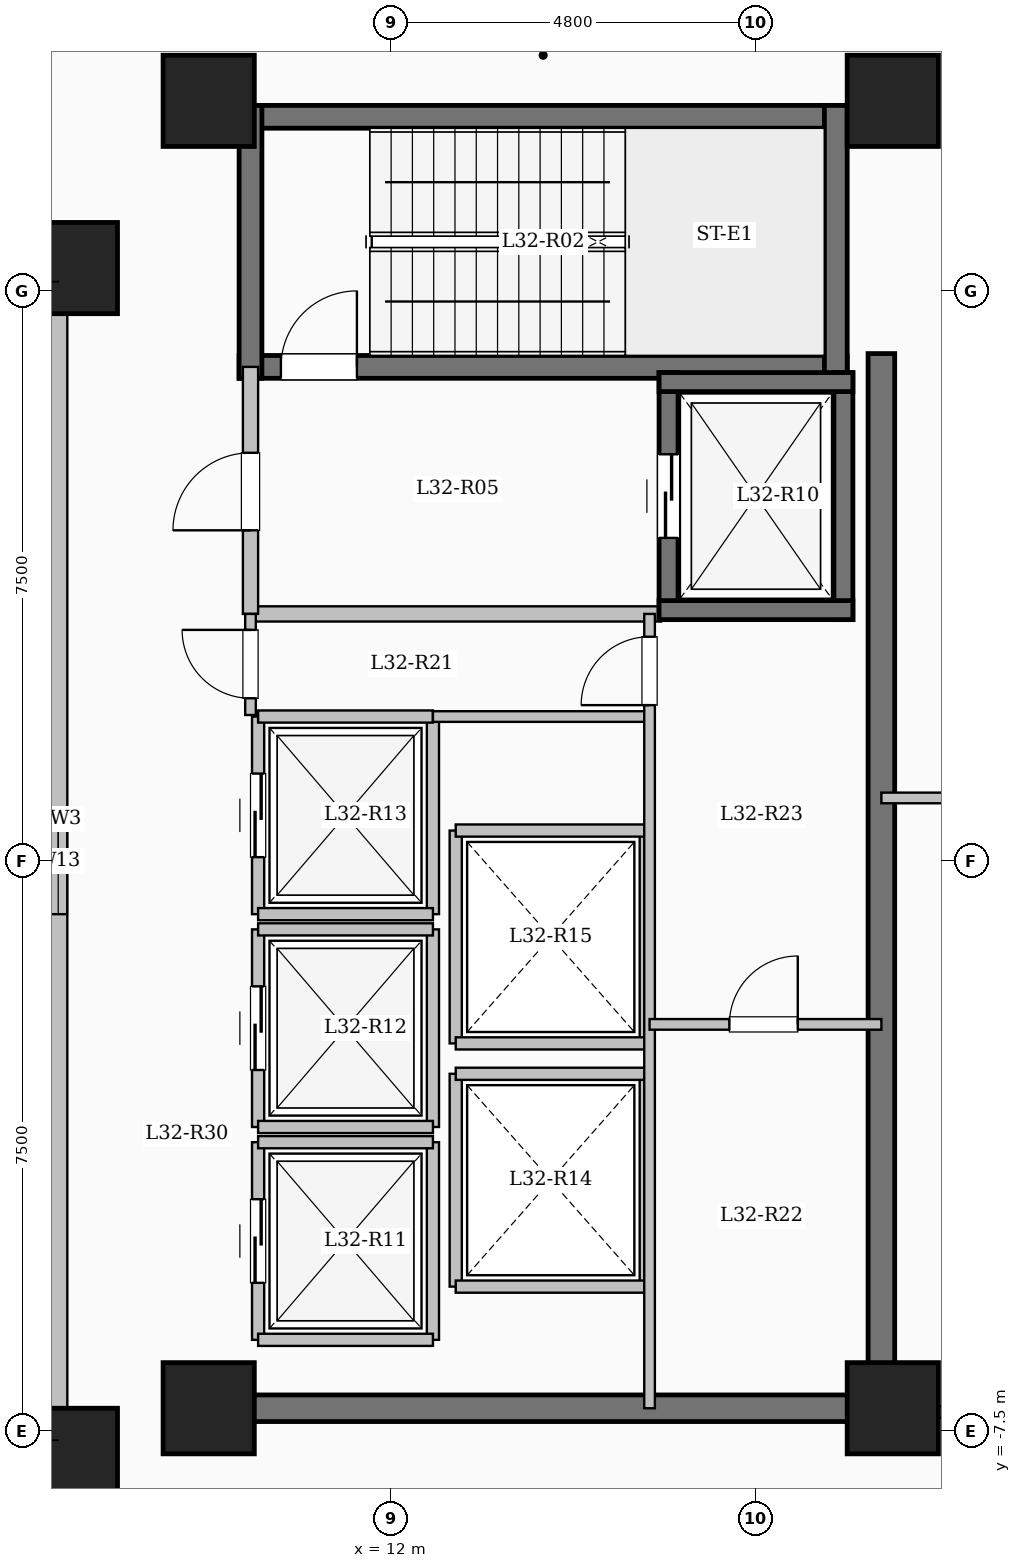
"""IFC4 building model, lengths in metres.
Left out: names, types, materials, properties, quantities, classifications, styles, units other than length and angle.
Written with IfcOpenShell. Run it as: python <this file> out.ifc"""

import sys

from ifc_helpers import new_model, si_unit, direction, frame, frame_2d, origin, origin_2d, place, context, subcontext, project, spatial, rectangle, extrude, element, fill, save


model = new_model("IFC4")
c1 = context("Model", 3, precision=1e-05, world=origin(), true_north=direction((0.0, 1.0)))
c2 = subcontext(c1, "Body", "Model", "MODEL_VIEW")
j1 = project(units=[si_unit("LENGTHUNIT", "METRE"), si_unit("PLANEANGLEUNIT", "RADIAN")], contexts=[c1])
p1 = place(None, origin())
s1 = spatial("IfcSite", under=j1, at=p1, CompositionType="ELEMENT")
p2 = place(p1, origin())
s2 = spatial("IfcBuilding", under=s1, at=p2, CompositionType="ELEMENT")
p3 = place(p2, frame((0.0, 0.0, 118.5)))
s3 = spatial("IfcBuildingStorey", under=s2, at=p3, CompositionType="ELEMENT", Elevation=118.5)
for number, where, z_axis, x_axis in (
    (1, (7.8, -7.8, 0.0), (0.0, 0.0, 1.0), (1.0, 0.0, 0.0)),
    (2, (7.8, 7.8, 0.0), (0.0, 0.0, 1.0), (1.0, 0.0, 0.0)),
    (3, (9.6, -7.2, 0.0), (0.0, 0.0, 1.0), (1.0, 0.0, 0.0)),
    (4, (9.6, 10.0, 0.0), (0.0, 0.0, 1.0), (1.0, 0.0, 0.0)),
    (5, (18.6, -7.2, 0.0), (0.0, 0.0, 1.0), (1.0, 0.0, 0.0)),
    (6, (18.6, 10.0, 0.0), (0.0, 0.0, 1.0), (1.0, 0.0, 0.0)),
):
    element("IfcColumn", number, at=place(p3, frame(where, z_axis=z_axis, x_axis=x_axis)), inside=s3, PredefinedType="COLUMN", context=c2, shape_type="SweptSolid", body=[
        extrude(rectangle(XDim=1.2, YDim=1.2, at=origin_2d()), origin(), (0.0, 0.0, 1.0), 4.5),
    ])
p4 = place(p3, frame((7.62, -7.62, 0.0), z_axis=(0.0, 0.0, 1.0), x_axis=(0.0, 1.0, 0.0)))
e7 = element("IfcWall", 7, at=p4, inside=s3, PredefinedType="SOLIDWALL", context=c2, shape_type="SweptSolid", body=[
    extrude(rectangle(XDim=15.24, YDim=0.24, at=frame_2d((7.62, 0.0))), origin(), (0.0, 0.0, 1.0), 4.2),
])
p5 = place(p4, frame((6.92, 0.0, 0.95)))
e8 = element("IfcOpeningElement", 8, at=p5, cuts=e7, PredefinedType="OPENING", context=c2, shape_type="SweptSolid", body=[
    extrude(rectangle(XDim=1.4, YDim=1.5, at=frame_2d((0.7, 0.75))), frame((0.0, 0.13, 0.0), z_axis=(0.0, -1.0, 0.0), x_axis=(1.0, 0.0, 0.0)), (0.0, 0.0, 1.0), 0.26),
])
p6 = place(p3, frame((10.0, 9.79, 0.0), z_axis=(0.0, 0.0, 1.0), x_axis=(1.0, 0.0, 0.0)))
e9 = element("IfcWall", 9, at=p6, inside=s3, PredefinedType="SHEAR", context=c2, shape_type="SweptSolid", body=[
    extrude(rectangle(XDim=8.0, YDim=0.3, at=frame_2d((4.0, 0.0))), origin(), (0.0, 0.0, 1.0), 4.5),
])
p7 = place(p3, frame((10.0, 6.5, 0.0), z_axis=(0.0, 0.0, 1.0), x_axis=(1.0, 0.0, 0.0)))
e10 = element("IfcWall", 10, at=p7, inside=s3, PredefinedType="SHEAR", context=c2, shape_type="SweptSolid", body=[
    extrude(rectangle(XDim=8.0, YDim=0.3, at=frame_2d((4.0, 0.0))), origin(), (0.0, 0.0, 1.0), 4.5),
])
p8 = place(p7, frame((0.55, 0.0, 0.0)))
e11 = element("IfcOpeningElement", 11, at=p8, cuts=e10, PredefinedType="OPENING", context=c2, shape_type="SweptSolid", body=[
    extrude(rectangle(XDim=1.0, YDim=2.15, at=frame_2d((0.5, 1.075))), frame((0.0, 0.16, 0.0), z_axis=(0.0, -1.0, 0.0), x_axis=(1.0, 0.0, 0.0)), (0.0, 0.0, 1.0), 0.32),
])
for number, where, z_axis, x_axis in (
    (12, (10.15, 6.35, 0.0), (0.0, 0.0, 1.0), (0.0, 1.0, 0.0)),
    (13, (17.85, 6.35, 0.0), (0.0, 0.0, 1.0), (0.0, 1.0, 0.0)),
):
    element("IfcWall", number, at=place(p3, frame(where, z_axis=z_axis, x_axis=x_axis)), inside=s3, PredefinedType="SHEAR", context=c2, shape_type="SweptSolid", body=[
        extrude(rectangle(XDim=3.59, YDim=0.3, at=frame_2d((1.795, 0.0))), origin(), (0.0, 0.0, 1.0), 4.5),
    ])
p9 = place(p3, frame((10.15, 3.25, 0.0), z_axis=(0.0, 0.0, 1.0), x_axis=(1.0, 0.0, 0.0)))
e14 = element("IfcWall", 14, at=p9, inside=s3, PredefinedType="SOLIDWALL", context=c2, shape_type="SweptSolid", body=[
    extrude(rectangle(XDim=5.4, YDim=0.2, at=frame_2d((2.7, 0.0))), origin(), (0.0, 0.0, 1.0), 4.2),
])
p10 = place(p3, frame((10.15, 3.25, 0.0), z_axis=(0.0, 0.0, 1.0), x_axis=(0.0, 1.0, 0.0)))
e15 = element("IfcWall", 15, at=p10, inside=s3, PredefinedType="SOLIDWALL", context=c2, shape_type="SweptSolid", body=[
    extrude(rectangle(XDim=3.25, YDim=0.2, at=frame_2d((1.625, 0.0))), origin(), (0.0, 0.0, 1.0), 4.2),
])
p11 = place(p10, frame((1.1, 0.0, 0.0)))
e16 = element("IfcOpeningElement", 16, at=p11, cuts=e15, PredefinedType="OPENING", context=c2, shape_type="SweptSolid", body=[
    extrude(rectangle(XDim=1.02, YDim=2.15, at=frame_2d((0.51, 1.075))), frame((0.0, 0.11, 0.0), z_axis=(0.0, -1.0, 0.0), x_axis=(1.0, 0.0, 0.0)), (0.0, 0.0, 1.0), 0.22),
])
p12 = place(p3, frame((15.65, 3.175, 0.0), z_axis=(0.0, 0.0, 1.0), x_axis=(0.0, 1.0, 0.0)))
e17 = element("IfcWall", 17, at=p12, inside=s3, PredefinedType="SHEAR", context=c2, shape_type="SweptSolid", body=[
    extrude(rectangle(XDim=3.25, YDim=0.25, at=frame_2d((1.625, 0.0))), origin(), (0.0, 0.0, 1.0), 4.5),
])
p13 = place(p12, frame((1.075, 0.0, 0.0)))
e18 = element("IfcOpeningElement", 18, at=p13, cuts=e17, PredefinedType="OPENING", context=c2, shape_type="SweptSolid", body=[
    extrude(rectangle(XDim=1.1, YDim=2.15, at=frame_2d((0.55, 1.075))), frame((0.0, 0.135, 0.0), z_axis=(0.0, -1.0, 0.0), x_axis=(1.0, 0.0, 0.0)), (0.0, 0.0, 1.0), 0.27),
])
p14 = place(p3, frame((17.95, 3.175, 0.0), z_axis=(0.0, 0.0, 1.0), x_axis=(0.0, 1.0, 0.0)))
e19 = element("IfcWall", 19, at=p14, inside=s3, PredefinedType="SHEAR", context=c2, shape_type="SweptSolid", body=[
    extrude(rectangle(XDim=3.25, YDim=0.25, at=frame_2d((1.625, 0.0))), origin(), (0.0, 0.0, 1.0), 4.5),
])
for number, where, z_axis, x_axis in (
    (20, (15.525, 3.3, 0.0), (0.0, 0.0, 1.0), (1.0, 0.0, 0.0)),
    (21, (15.525, 6.3, 0.0), (0.0, 0.0, 1.0), (1.0, 0.0, 0.0)),
):
    element("IfcWall", number, at=place(p3, frame(where, z_axis=z_axis, x_axis=x_axis)), inside=s3, PredefinedType="SHEAR", context=c2, shape_type="SweptSolid", body=[
        extrude(rectangle(XDim=2.55, YDim=0.25, at=frame_2d((1.275, 0.0))), origin(), (0.0, 0.0, 1.0), 4.5),
    ])
p15 = place(p3, frame((10.25, -6.3, 0.0), z_axis=(0.0, 0.0, 1.0), x_axis=(0.0, 1.0, 0.0)))
e22 = element("IfcWall", 22, at=p15, inside=s3, PredefinedType="SOLIDWALL", context=c2, shape_type="SweptSolid", body=[
    extrude(rectangle(XDim=2.6, YDim=0.16, at=frame_2d((1.3, 0.0))), origin(), (0.0, 0.0, 1.0), 4.2),
])
p16 = place(p15, frame((0.75, 0.0, 0.0)))
e23 = element("IfcOpeningElement", 23, at=p16, cuts=e22, PredefinedType="OPENING", context=c2, shape_type="SweptSolid", body=[
    extrude(rectangle(XDim=1.1, YDim=2.15, at=frame_2d((0.55, 1.075))), frame((0.0, 0.09, 0.0), z_axis=(0.0, -1.0, 0.0), x_axis=(1.0, 0.0, 0.0)), (0.0, 0.0, 1.0), 0.18),
])
p17 = place(p3, frame((12.55, -6.3, 0.0), z_axis=(0.0, 0.0, 1.0), x_axis=(0.0, 1.0, 0.0)))
e24 = element("IfcWall", 24, at=p17, inside=s3, PredefinedType="SOLIDWALL", context=c2, shape_type="SweptSolid", body=[
    extrude(rectangle(XDim=2.6, YDim=0.16, at=frame_2d((1.3, 0.0))), origin(), (0.0, 0.0, 1.0), 4.2),
])
for number, where, z_axis, x_axis in (
    (25, (10.25, -6.3, 0.0), (0.0, 0.0, 1.0), (1.0, 0.0, 0.0)),
    (26, (10.25, -3.7, 0.0), (0.0, 0.0, 1.0), (1.0, 0.0, 0.0)),
):
    element("IfcWall", number, at=place(p3, frame(where, z_axis=z_axis, x_axis=x_axis)), inside=s3, PredefinedType="SOLIDWALL", context=c2, shape_type="SweptSolid", body=[
        extrude(rectangle(XDim=2.3, YDim=0.16, at=frame_2d((1.15, 0.0))), origin(), (0.0, 0.0, 1.0), 4.2),
    ])
p18 = place(p3, frame((10.25, -3.5, 0.0), z_axis=(0.0, 0.0, 1.0), x_axis=(0.0, 1.0, 0.0)))
e27 = element("IfcWall", 27, at=p18, inside=s3, PredefinedType="SOLIDWALL", context=c2, shape_type="SweptSolid", body=[
    extrude(rectangle(XDim=2.6, YDim=0.16, at=frame_2d((1.3, 0.0))), origin(), (0.0, 0.0, 1.0), 4.2),
])
p19 = place(p18, frame((0.75, 0.0, 0.0)))
e28 = element("IfcOpeningElement", 28, at=p19, cuts=e27, PredefinedType="OPENING", context=c2, shape_type="SweptSolid", body=[
    extrude(rectangle(XDim=1.1, YDim=2.15, at=frame_2d((0.55, 1.075))), frame((0.0, 0.09, 0.0), z_axis=(0.0, -1.0, 0.0), x_axis=(1.0, 0.0, 0.0)), (0.0, 0.0, 1.0), 0.18),
])
p20 = place(p3, frame((12.55, -3.5, 0.0), z_axis=(0.0, 0.0, 1.0), x_axis=(0.0, 1.0, 0.0)))
e29 = element("IfcWall", 29, at=p20, inside=s3, PredefinedType="SOLIDWALL", context=c2, shape_type="SweptSolid", body=[
    extrude(rectangle(XDim=2.6, YDim=0.16, at=frame_2d((1.3, 0.0))), origin(), (0.0, 0.0, 1.0), 4.2),
])
for number, where, z_axis, x_axis in (
    (30, (10.25, -3.5, 0.0), (0.0, 0.0, 1.0), (1.0, 0.0, 0.0)),
    (31, (10.25, -0.9, 0.0), (0.0, 0.0, 1.0), (1.0, 0.0, 0.0)),
):
    element("IfcWall", number, at=place(p3, frame(where, z_axis=z_axis, x_axis=x_axis)), inside=s3, PredefinedType="SOLIDWALL", context=c2, shape_type="SweptSolid", body=[
        extrude(rectangle(XDim=2.3, YDim=0.16, at=frame_2d((1.15, 0.0))), origin(), (0.0, 0.0, 1.0), 4.2),
    ])
p21 = place(p3, frame((10.25, -0.7, 0.0), z_axis=(0.0, 0.0, 1.0), x_axis=(0.0, 1.0, 0.0)))
e32 = element("IfcWall", 32, at=p21, inside=s3, PredefinedType="SOLIDWALL", context=c2, shape_type="SweptSolid", body=[
    extrude(rectangle(XDim=2.6, YDim=0.16, at=frame_2d((1.3, 0.0))), origin(), (0.0, 0.0, 1.0), 4.2),
])
p22 = place(p21, frame((0.75, 0.0, 0.0)))
e33 = element("IfcOpeningElement", 33, at=p22, cuts=e32, PredefinedType="OPENING", context=c2, shape_type="SweptSolid", body=[
    extrude(rectangle(XDim=1.1, YDim=2.15, at=frame_2d((0.55, 1.075))), frame((0.0, 0.09, 0.0), z_axis=(0.0, -1.0, 0.0), x_axis=(1.0, 0.0, 0.0)), (0.0, 0.0, 1.0), 0.18),
])
p23 = place(p3, frame((12.55, -0.7, 0.0), z_axis=(0.0, 0.0, 1.0), x_axis=(0.0, 1.0, 0.0)))
e34 = element("IfcWall", 34, at=p23, inside=s3, PredefinedType="SOLIDWALL", context=c2, shape_type="SweptSolid", body=[
    extrude(rectangle(XDim=2.6, YDim=0.16, at=frame_2d((1.3, 0.0))), origin(), (0.0, 0.0, 1.0), 4.2),
])
for number, where, z_axis, x_axis in (
    (35, (10.25, -0.7, 0.0), (0.0, 0.0, 1.0), (1.0, 0.0, 0.0)),
    (36, (10.25, 1.9, 0.0), (0.0, 0.0, 1.0), (1.0, 0.0, 0.0)),
):
    element("IfcWall", number, at=place(p3, frame(where, z_axis=z_axis, x_axis=x_axis)), inside=s3, PredefinedType="SOLIDWALL", context=c2, shape_type="SweptSolid", body=[
        extrude(rectangle(XDim=2.3, YDim=0.16, at=frame_2d((1.15, 0.0))), origin(), (0.0, 0.0, 1.0), 4.2),
    ])
for number, where, z_axis, x_axis in (
    (37, (12.85, -5.6, 0.0), (0.0, 0.0, 1.0), (0.0, 1.0, 0.0)),
    (38, (15.35, -5.6, 0.0), (0.0, 0.0, 1.0), (0.0, 1.0, 0.0)),
):
    element("IfcWall", number, at=place(p3, frame(where, z_axis=z_axis, x_axis=x_axis)), inside=s3, PredefinedType="SOLIDWALL", context=c2, shape_type="SweptSolid", body=[
        extrude(rectangle(XDim=2.8, YDim=0.16, at=frame_2d((1.4, 0.0))), origin(), (0.0, 0.0, 1.0), 4.2),
    ])
for number, where, z_axis, x_axis in (
    (39, (12.85, -5.6, 0.0), (0.0, 0.0, 1.0), (1.0, 0.0, 0.0)),
    (40, (12.85, -2.8, 0.0), (0.0, 0.0, 1.0), (1.0, 0.0, 0.0)),
):
    element("IfcWall", number, at=place(p3, frame(where, z_axis=z_axis, x_axis=x_axis)), inside=s3, PredefinedType="SOLIDWALL", context=c2, shape_type="SweptSolid", body=[
        extrude(rectangle(XDim=2.5, YDim=0.16, at=frame_2d((1.25, 0.0))), origin(), (0.0, 0.0, 1.0), 4.2),
    ])
for number, where, z_axis, x_axis in (
    (41, (12.85, -2.4, 0.0), (0.0, 0.0, 1.0), (0.0, 1.0, 0.0)),
    (42, (15.35, -2.4, 0.0), (0.0, 0.0, 1.0), (0.0, 1.0, 0.0)),
):
    element("IfcWall", number, at=place(p3, frame(where, z_axis=z_axis, x_axis=x_axis)), inside=s3, PredefinedType="SOLIDWALL", context=c2, shape_type="SweptSolid", body=[
        extrude(rectangle(XDim=2.8, YDim=0.16, at=frame_2d((1.4, 0.0))), origin(), (0.0, 0.0, 1.0), 4.2),
    ])
for number, where, z_axis, x_axis in (
    (43, (12.85, -2.4, 0.0), (0.0, 0.0, 1.0), (1.0, 0.0, 0.0)),
    (44, (12.85, 0.4, 0.0), (0.0, 0.0, 1.0), (1.0, 0.0, 0.0)),
):
    element("IfcWall", number, at=place(p3, frame(where, z_axis=z_axis, x_axis=x_axis)), inside=s3, PredefinedType="SOLIDWALL", context=c2, shape_type="SweptSolid", body=[
        extrude(rectangle(XDim=2.5, YDim=0.16, at=frame_2d((1.25, 0.0))), origin(), (0.0, 0.0, 1.0), 4.2),
    ])
p24 = place(p3, frame((18.45, -7.375, 0.0), z_axis=(0.0, 0.0, 1.0), x_axis=(0.0, 1.0, 0.0)))
e45 = element("IfcWall", 45, at=p24, inside=s3, PredefinedType="SHEAR", context=c2, shape_type="SweptSolid", body=[
    extrude(rectangle(XDim=14.05, YDim=0.35, at=frame_2d((7.025, 0.0))), origin(), (0.0, 0.0, 1.0), 4.5),
])
p25 = place(p3, frame((10.075, -7.2, 0.0), z_axis=(0.0, 0.0, 1.0), x_axis=(1.0, 0.0, 0.0)))
e46 = element("IfcWall", 46, at=p25, inside=s3, PredefinedType="SHEAR", context=c2, shape_type="SweptSolid", body=[
    extrude(rectangle(XDim=8.55, YDim=0.35, at=frame_2d((4.275, 0.0))), origin(), (0.0, 0.0, 1.0), 4.5),
])
p26 = place(p3, frame((12.55, 1.9, 0.0), z_axis=(0.0, 0.0, 1.0), x_axis=(1.0, 0.0, 0.0)))
e47 = element("IfcWall", 47, at=p26, inside=s3, PredefinedType="PARTITIONING", context=c2, shape_type="SweptSolid", body=[
    extrude(rectangle(XDim=2.85, YDim=0.14, at=frame_2d((1.425, 0.0))), origin(), (0.0, 0.0, 1.0), 4.2),
])
p27 = place(p3, frame((10.15, 1.92, 0.0), z_axis=(0.0, 0.0, 1.0), x_axis=(0.0, 1.0, 0.0)))
e48 = element("IfcWall", 48, at=p27, inside=s3, PredefinedType="PARTITIONING", context=c2, shape_type="SweptSolid", body=[
    extrude(rectangle(XDim=1.33, YDim=0.14, at=frame_2d((0.665, 0.0))), origin(), (0.0, 0.0, 1.0), 4.2),
])
p28 = place(p27, frame((0.22, 0.0, 0.0)))
e49 = element("IfcOpeningElement", 49, at=p28, cuts=e48, PredefinedType="OPENING", context=c2, shape_type="SweptSolid", body=[
    extrude(rectangle(XDim=0.9, YDim=2.08, at=frame_2d((0.45, 1.04))), frame((0.0, 0.08, 0.0), z_axis=(0.0, -1.0, 0.0), x_axis=(1.0, 0.0, 0.0)), (0.0, 0.0, 1.0), 0.16),
])
p29 = place(p3, frame((15.4, -7.2, 0.0), z_axis=(0.0, 0.0, 1.0), x_axis=(0.0, 1.0, 0.0)))
e50 = element("IfcWall", 50, at=p29, inside=s3, PredefinedType="PARTITIONING", context=c2, shape_type="SweptSolid", body=[
    extrude(rectangle(XDim=10.45, YDim=0.14, at=frame_2d((5.225, 0.0))), origin(), (0.0, 0.0, 1.0), 4.2),
])
p30 = place(p29, frame((9.25, 0.0, 0.0)))
e51 = element("IfcOpeningElement", 51, at=p30, cuts=e50, PredefinedType="OPENING", context=c2, shape_type="SweptSolid", body=[
    extrude(rectangle(XDim=0.9, YDim=2.08, at=frame_2d((0.45, 1.04))), frame((0.0, 0.08, 0.0), z_axis=(0.0, -1.0, 0.0), x_axis=(1.0, 0.0, 0.0)), (0.0, 0.0, 1.0), 0.16),
])
p31 = place(p3, frame((15.4, -2.15, 0.0), z_axis=(0.0, 0.0, 1.0), x_axis=(1.0, 0.0, 0.0)))
e52 = element("IfcWall", 52, at=p31, inside=s3, PredefinedType="PARTITIONING", context=c2, shape_type="SweptSolid", body=[
    extrude(rectangle(XDim=3.05, YDim=0.14, at=frame_2d((1.525, 0.0))), origin(), (0.0, 0.0, 1.0), 4.2),
])
p32 = place(p31, frame((1.05, 0.0, 0.0)))
e53 = element("IfcOpeningElement", 53, at=p32, cuts=e52, PredefinedType="OPENING", context=c2, shape_type="SweptSolid", body=[
    extrude(rectangle(XDim=0.9, YDim=2.08, at=frame_2d((0.45, 1.04))), frame((0.0, 0.08, 0.0), z_axis=(0.0, -1.0, 0.0), x_axis=(1.0, 0.0, 0.0)), (0.0, 0.0, 1.0), 0.16),
])
p33 = place(p3, frame((18.45, -7.25, 0.0), z_axis=(0.0, 0.0, 1.0), x_axis=(1.0, 0.0, 0.0)))
e54 = element("IfcWall", 54, at=p33, inside=s3, PredefinedType="PARTITIONING", context=c2, shape_type="SweptSolid", body=[
    extrude(rectangle(XDim=8.43, YDim=0.15, at=frame_2d((4.215, 0.0))), origin(), (0.0, 0.0, 1.0), 4.2),
])
p34 = place(p33, frame((1.95, 0.0, 0.0)))
e55 = element("IfcOpeningElement", 55, at=p34, cuts=e54, PredefinedType="OPENING", context=c2, shape_type="SweptSolid", body=[
    extrude(rectangle(XDim=1.08, YDim=2.15, at=frame_2d((0.54, 1.075))), frame((0.0, 0.085, 0.0), z_axis=(0.0, -1.0, 0.0), x_axis=(1.0, 0.0, 0.0)), (0.0, 0.0, 1.0), 0.17),
])
p35 = place(p3, frame((18.45, 0.829, 0.0), z_axis=(0.0, 0.0, 1.0), x_axis=(1.0, 0.0, 0.0)))
e56 = element("IfcWall", 56, at=p35, inside=s3, PredefinedType="PARTITIONING", context=c2, shape_type="SweptSolid", body=[
    extrude(rectangle(XDim=8.43, YDim=0.14, at=frame_2d((4.215, 0.0))), origin(), (0.0, 0.0, 1.0), 4.2),
])
p36 = place(p35, frame((0.9, 0.0, 0.0)))
e57 = element("IfcOpeningElement", 57, at=p36, cuts=e56, PredefinedType="OPENING", context=c2, shape_type="SweptSolid", body=[
    extrude(rectangle(XDim=1.08, YDim=2.15, at=frame_2d((0.54, 1.075))), frame((0.0, 0.08, 0.0), z_axis=(0.0, -1.0, 0.0), x_axis=(1.0, 0.0, 0.0)), (0.0, 0.0, 1.0), 0.16),
])
p37 = place(p5, origin())
e58 = element("IfcWindow", 58, at=p37, inside=s3, PartitioningType="SINGLE_PANEL", PredefinedType="WINDOW", context=c2, shape_type="SweptSolid", body=[
    extrude(rectangle(XDim=1.4, YDim=1.5, at=frame_2d((0.7, 0.75))), frame((0.0, 0.03, 0.0), z_axis=(0.0, -1.0, 0.0), x_axis=(1.0, 0.0, 0.0)), (0.0, 0.0, 1.0), 0.06),
])
fill(e8, e58)
p38 = place(p8, origin())
e59 = element("IfcDoor", 59, at=p38, inside=s3, OperationType="SINGLE_SWING_RIGHT", PredefinedType="DOOR", context=c2, shape_type="SweptSolid", body=[
    extrude(rectangle(XDim=1.0, YDim=2.15, at=frame_2d((0.5, 1.075))), frame((0.0, 0.025, 0.0), z_axis=(0.0, -1.0, 0.0), x_axis=(1.0, 0.0, 0.0)), (0.0, 0.0, 1.0), 0.05),
])
fill(e11, e59)
p39 = place(p11, origin())
e60 = element("IfcDoor", 60, at=p39, inside=s3, OperationType="SINGLE_SWING_LEFT", PredefinedType="DOOR", context=c2, shape_type="SweptSolid", body=[
    extrude(rectangle(XDim=1.02, YDim=2.15, at=frame_2d((0.51, 1.075))), frame((0.0, 0.025, 0.0), z_axis=(0.0, -1.0, 0.0), x_axis=(1.0, 0.0, 0.0)), (0.0, 0.0, 1.0), 0.05),
])
fill(e16, e60)
p40 = place(p13, origin())
e61 = element("IfcDoor", 61, at=p40, inside=s3, OperationType="SLIDING_TO_LEFT", PredefinedType="DOOR", context=c2, shape_type="SweptSolid", body=[
    extrude(rectangle(XDim=1.1, YDim=2.15, at=frame_2d((0.55, 1.075))), frame((0.0, 0.025, 0.0), z_axis=(0.0, -1.0, 0.0), x_axis=(1.0, 0.0, 0.0)), (0.0, 0.0, 1.0), 0.05),
])
fill(e18, e61)
p41 = place(p16, origin())
e62 = element("IfcDoor", 62, at=p41, inside=s3, OperationType="SLIDING_TO_LEFT", PredefinedType="DOOR", context=c2, shape_type="SweptSolid", body=[
    extrude(rectangle(XDim=1.1, YDim=2.15, at=frame_2d((0.55, 1.075))), frame((0.0, 0.025, 0.0), z_axis=(0.0, -1.0, 0.0), x_axis=(1.0, 0.0, 0.0)), (0.0, 0.0, 1.0), 0.05),
])
fill(e23, e62)
p42 = place(p19, origin())
e63 = element("IfcDoor", 63, at=p42, inside=s3, OperationType="SLIDING_TO_LEFT", PredefinedType="DOOR", context=c2, shape_type="SweptSolid", body=[
    extrude(rectangle(XDim=1.1, YDim=2.15, at=frame_2d((0.55, 1.075))), frame((0.0, 0.025, 0.0), z_axis=(0.0, -1.0, 0.0), x_axis=(1.0, 0.0, 0.0)), (0.0, 0.0, 1.0), 0.05),
])
fill(e28, e63)
p43 = place(p22, origin())
e64 = element("IfcDoor", 64, at=p43, inside=s3, OperationType="SLIDING_TO_LEFT", PredefinedType="DOOR", context=c2, shape_type="SweptSolid", body=[
    extrude(rectangle(XDim=1.1, YDim=2.15, at=frame_2d((0.55, 1.075))), frame((0.0, 0.025, 0.0), z_axis=(0.0, -1.0, 0.0), x_axis=(1.0, 0.0, 0.0)), (0.0, 0.0, 1.0), 0.05),
])
fill(e33, e64)
p44 = place(p28, origin())
e65 = element("IfcDoor", 65, at=p44, inside=s3, OperationType="SINGLE_SWING_RIGHT", PredefinedType="DOOR", context=c2, shape_type="SweptSolid", body=[
    extrude(rectangle(XDim=0.9, YDim=2.08, at=frame_2d((0.45, 1.04))), frame((0.0, 0.025, 0.0), z_axis=(0.0, -1.0, 0.0), x_axis=(1.0, 0.0, 0.0)), (0.0, 0.0, 1.0), 0.05),
])
fill(e49, e65)
p45 = place(p30, origin())
e66 = element("IfcDoor", 66, at=p45, inside=s3, OperationType="SINGLE_SWING_LEFT", PredefinedType="DOOR", context=c2, shape_type="SweptSolid", body=[
    extrude(rectangle(XDim=0.9, YDim=2.08, at=frame_2d((0.45, 1.04))), frame((0.0, 0.025, 0.0), z_axis=(0.0, -1.0, 0.0), x_axis=(1.0, 0.0, 0.0)), (0.0, 0.0, 1.0), 0.05),
])
fill(e51, e66)
p46 = place(p32, origin())
e67 = element("IfcDoor", 67, at=p46, inside=s3, OperationType="SINGLE_SWING_RIGHT", PredefinedType="DOOR", context=c2, shape_type="SweptSolid", body=[
    extrude(rectangle(XDim=0.9, YDim=2.08, at=frame_2d((0.45, 1.04))), frame((0.0, 0.025, 0.0), z_axis=(0.0, -1.0, 0.0), x_axis=(1.0, 0.0, 0.0)), (0.0, 0.0, 1.0), 0.05),
])
fill(e53, e67)
save(model, sys.argv[1])
